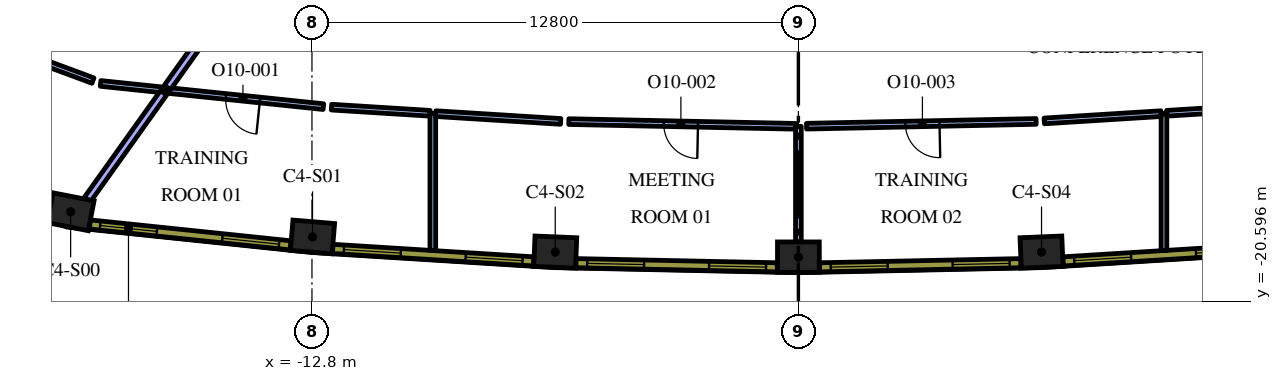
"""IFC4 building model, lengths in metres.
Left out: names, types, materials, properties, quantities, classifications, styles, units other than length and angle.
Written with IfcOpenShell. Run it as: python <this file> out.ifc"""

import sys

from ifc_helpers import new_model, si_unit, direction, frame, frame_2d, origin, origin_2d, place, context, subcontext, project, spatial, rectangle, extrude, element, fill, save


model = new_model("IFC4")
c1 = context("Model", 3, precision=1e-05, world=origin(), true_north=direction((0.0, 1.0)))
c2 = subcontext(c1, "Body", "Model", "MODEL_VIEW")
j1 = project(units=[si_unit("LENGTHUNIT", "METRE"), si_unit("PLANEANGLEUNIT", "RADIAN")], contexts=[c1])
p1 = place(None, origin())
s1 = spatial("IfcSite", under=j1, at=p1, CompositionType="ELEMENT")
p2 = place(p1, origin())
s2 = spatial("IfcBuilding", under=s1, at=p2, CompositionType="ELEMENT")
p3 = place(p2, frame((0.0, 0.0, 252.0)))
s3 = spatial("IfcBuildingStorey", under=s2, at=p3, CompositionType="ELEMENT", Elevation=252.0)
for number, where, z_axis, x_axis in (
    (1, (-19.15, -18.237, 0.0), (0.0, 0.0, 1.0), (0.981, -0.192, 0.0)),
    (2, (-12.785, -18.9, 0.0), (0.0, 0.0, 1.0), (0.997, -0.083, 0.0)),
    (3, (-6.398, -19.298, 0.0), (0.0, 0.0, 1.0), (0.999, -0.041, 0.0)),
    (4, (0.0, -19.431, 0.0), (0.0, 0.0, 1.0), (1.0, 0.0, 0.0)),
    (5, (6.398, -19.298, 0.0), (0.0, 0.0, 1.0), (0.999, 0.041, 0.0)),
):
    element("IfcColumn", number, at=place(p3, frame(where, z_axis=z_axis, x_axis=x_axis)), inside=s3, PredefinedType="COLUMN", context=c2, shape_type="SweptSolid", body=[
        extrude(rectangle(XDim=1.1, YDim=0.8, at=origin_2d()), origin(), (0.0, 0.0, 1.0), 4.2),
    ])
p4 = place(p3, frame((-9.62, -15.65, 0.0), z_axis=(0.0, 0.0, 1.0), x_axis=(0.0, -1.0, 0.0)))
e6 = element("IfcWall", 6, at=p4, inside=s3, PredefinedType="PARTITIONING", context=c2, shape_type="SweptSolid", body=[
    extrude(rectangle(XDim=3.607, YDim=0.15, at=frame_2d((1.803, 0.0))), origin(), (0.0, 0.0, 1.0), 3.4),
])
p5 = place(p3, frame((-12.5, -15.471, 0.0), z_axis=(0.0, 0.0, 1.0), x_axis=(-0.99462267413, 0.103565129778, 0.0)))
e7 = element("IfcWall", 7, at=p5, inside=s3, PredefinedType="PARTITIONING", context=c2, shape_type="SweptSolid", body=[
    extrude(rectangle(XDim=4.177, YDim=0.15, at=frame_2d((2.089, 0.0))), origin(), (0.0, 0.0, 1.0), 3.4),
])
p6 = place(p5, frame((1.677, 0.0, 0.0)))
e8 = element("IfcOpeningElement", 8, at=p6, cuts=e7, PredefinedType="OPENING", context=c2, shape_type="SweptSolid", body=[
    extrude(rectangle(XDim=0.9, YDim=2.1, at=frame_2d((0.45, 1.05))), frame((0.0, 0.085, 0.0), z_axis=(0.0, -1.0, 0.0), x_axis=(1.0, 0.0, 0.0)), (0.0, 0.0, 1.0), 0.17),
])
p7 = place(p3, frame((-12.286, -15.484, 0.0), z_axis=(0.0, 0.0, 1.0), x_axis=(0.99806098397, -0.062243652509, 0.0)))
e9 = element("IfcWall", 9, at=p7, inside=s3, PredefinedType="PARTITIONING", context=c2, shape_type="SweptSolid", body=[
    extrude(rectangle(XDim=2.597, YDim=0.15, at=frame_2d((1.298, 0.0))), origin(), (0.0, 0.0, 1.0), 3.4),
])
p8 = place(p3, frame((-18.709, -17.916, 0.0), z_axis=(0.0, 0.0, 1.0), x_axis=(0.581023923954, 0.813886478444, 0.0)))
e10 = element("IfcWall", 10, at=p8, inside=s3, PredefinedType="PARTITIONING", context=c2, shape_type="SweptSolid", body=[
    extrude(rectangle(XDim=3.449, YDim=0.2, at=frame_2d((1.725, 0.0))), origin(), (0.0, 0.0, 1.0), 3.4),
])
p9 = place(p3, frame((0.0, -15.99, 0.0), z_axis=(0.0, 0.0, 1.0), x_axis=(0.0, -1.0, 0.0)))
e11 = element("IfcWall", 11, at=p9, inside=s3, PredefinedType="PARTITIONING", context=c2, shape_type="SweptSolid", body=[
    extrude(rectangle(XDim=3.041, YDim=0.15, at=frame_2d((1.52, 0.0))), origin(), (0.0, 0.0, 1.0), 3.4),
])
p10 = place(p3, frame((-9.545, -15.655, 0.0), z_axis=(0.0, 0.0, 1.0), x_axis=(0.998062078928, -0.062226092652, 0.0)))
e12 = element("IfcWall", 12, at=p10, inside=s3, PredefinedType="PARTITIONING", context=c2, shape_type="SweptSolid", body=[
    extrude(rectangle(XDim=3.296, YDim=0.15, at=frame_2d((1.648, 0.0))), origin(), (0.0, 0.0, 1.0), 3.4),
])
p11 = place(p3, frame((-0.075, -15.988, 0.0), z_axis=(0.0, 0.0, 1.0), x_axis=(-0.999784863333, 0.020741915284, 0.0)))
e13 = element("IfcWall", 13, at=p11, inside=s3, PredefinedType="PARTITIONING", context=c2, shape_type="SweptSolid", body=[
    extrude(rectangle(XDim=5.968, YDim=0.15, at=frame_2d((2.984, 0.0))), origin(), (0.0, 0.0, 1.0), 3.4),
])
p12 = place(p11, frame((2.567, 0.0, 0.0)))
e14 = element("IfcOpeningElement", 14, at=p12, cuts=e13, PredefinedType="OPENING", context=c2, shape_type="SweptSolid", body=[
    extrude(rectangle(XDim=0.9, YDim=2.1, at=frame_2d((0.45, 1.05))), frame((0.0, 0.085, 0.0), z_axis=(0.0, -1.0, 0.0), x_axis=(1.0, 0.0, 0.0)), (0.0, 0.0, 1.0), 0.17),
])
p13 = place(p3, frame((9.62, -15.65, 0.0), z_axis=(0.0, 0.0, 1.0), x_axis=(0.0, -1.0, 0.0)))
e15 = element("IfcWall", 15, at=p13, inside=s3, PredefinedType="PARTITIONING", context=c2, shape_type="SweptSolid", body=[
    extrude(rectangle(XDim=3.607, YDim=0.15, at=frame_2d((1.803, 0.0))), origin(), (0.0, 0.0, 1.0), 3.4),
])
p14 = place(p3, frame((6.255, -15.86, 0.0), z_axis=(0.0, 0.0, 1.0), x_axis=(-0.999785172511, -0.020727007213, 0.0)))
e16 = element("IfcWall", 16, at=p14, inside=s3, PredefinedType="PARTITIONING", context=c2, shape_type="SweptSolid", body=[
    extrude(rectangle(XDim=6.042, YDim=0.15, at=frame_2d((3.021, 0.0))), origin(), (0.0, 0.0, 1.0), 3.4),
])
p15 = place(p14, frame((2.542, 0.0, 0.0)))
e17 = element("IfcOpeningElement", 17, at=p15, cuts=e16, PredefinedType="OPENING", context=c2, shape_type="SweptSolid", body=[
    extrude(rectangle(XDim=0.9, YDim=2.1, at=frame_2d((0.45, 1.05))), frame((0.0, 0.085, 0.0), z_axis=(0.0, -1.0, 0.0), x_axis=(1.0, 0.0, 0.0)), (0.0, 0.0, 1.0), 0.17),
])
p16 = place(p3, frame((6.469, -15.847, 0.0), z_axis=(0.0, 0.0, 1.0), x_axis=(0.998063968491, 0.062195777984, 0.0)))
e18 = element("IfcWall", 18, at=p16, inside=s3, PredefinedType="PARTITIONING", context=c2, shape_type="SweptSolid", body=[
    extrude(rectangle(XDim=3.081, YDim=0.15, at=frame_2d((1.541, 0.0))), origin(), (0.0, 0.0, 1.0), 3.4),
])
p17 = place(p3, frame((9.695, -15.646, 0.0), z_axis=(0.0, 0.0, 1.0), x_axis=(0.998058994434, 0.062275545993, 0.0)))
e19 = element("IfcWall", 19, at=p17, inside=s3, PredefinedType="PARTITIONING", context=c2, shape_type="SweptSolid", body=[
    extrude(rectangle(XDim=2.811, YDim=0.15, at=frame_2d((1.405, 0.0))), origin(), (0.0, 0.0, 1.0), 3.4),
])
p18 = place(p3, frame((-16.604, -14.968, 0.0), z_axis=(0.0, 0.0, 1.0), x_axis=(0.581000735813, 0.813903031684, 0.0)))
e20 = element("IfcWall", 20, at=p18, inside=s3, PredefinedType="PARTITIONING", context=c2, shape_type="SweptSolid", body=[
    extrude(rectangle(XDim=3.696, YDim=0.2, at=frame_2d((1.848, 0.0))), origin(), (0.0, 0.0, 1.0), 3.4),
])
p19 = place(p3, frame((-16.769, -15.026, 0.0), z_axis=(0.0, 0.0, 1.0), x_axis=(-0.994627569422, 0.103518105401, 0.0)))
e21 = element("IfcWall", 21, at=p19, inside=s3, PredefinedType="PARTITIONING", context=c2, shape_type="SweptSolid", body=[
    extrude(rectangle(XDim=1.601, YDim=0.15, at=frame_2d((0.801, 0.0))), origin(), (0.0, 0.0, 1.0), 3.4),
])
p20 = place(p3, frame((-18.562, -14.786, 0.0), z_axis=(0.0, 0.0, 1.0), x_axis=(-0.937602119917, 0.347710029662, 0.0)))
e22 = element("IfcWall", 22, at=p20, inside=s3, PredefinedType="PARTITIONING", context=c2, shape_type="SweptSolid", body=[
    extrude(rectangle(XDim=2.11, YDim=0.15, at=frame_2d((1.055, 0.0))), origin(), (0.0, 0.0, 1.0), 3.4),
])
p21 = place(p3, frame((-18.644, -18.571, 0.0), z_axis=(0.0, 0.0, 1.0), x_axis=(0.994621961215, -0.103571976272, 0.0)))
e23 = element("IfcWall", 23, at=p21, inside=s3, PredefinedType="SOLIDWALL", context=c2, shape_type="SweptSolid", body=[
    extrude(rectangle(XDim=5.311, YDim=0.24, at=frame_2d((2.655, 0.0))), origin(), (0.0, 0.0, 1.0), 3.9),
])
p22 = place(p21, frame((0.271, 0.0, 0.9)))
e24 = element("IfcOpeningElement", 24, at=p22, cuts=e23, PredefinedType="OPENING", context=c2, shape_type="SweptSolid", body=[
    extrude(rectangle(XDim=1.5, YDim=2.55, at=frame_2d((0.75, 1.275))), frame((0.0, 0.13, 0.0), z_axis=(0.0, -1.0, 0.0), x_axis=(1.0, 0.0, 0.0)), (0.0, 0.0, 1.0), 0.26),
])
p23 = place(p21, frame((3.504, 0.0, 0.9)))
e25 = element("IfcOpeningElement", 25, at=p23, cuts=e23, PredefinedType="OPENING", context=c2, shape_type="SweptSolid", body=[
    extrude(rectangle(XDim=1.5, YDim=2.55, at=frame_2d((0.75, 1.275))), frame((0.0, 0.13, 0.0), z_axis=(0.0, -1.0, 0.0), x_axis=(1.0, 0.0, 0.0)), (0.0, 0.0, 1.0), 0.26),
])
p24 = place(p3, frame((-12.253, -19.213, 0.0), z_axis=(0.0, 0.0, 1.0), x_axis=(0.9980633213, -0.062206162685, 0.0)))
e26 = element("IfcWall", 26, at=p24, inside=s3, PredefinedType="SOLIDWALL", context=c2, shape_type="SweptSolid", body=[
    extrude(rectangle(XDim=5.298, YDim=0.24, at=frame_2d((2.649, 0.0))), origin(), (0.0, 0.0, 1.0), 3.9),
])
p25 = place(p24, frame((0.294, 0.0, 0.9)))
e27 = element("IfcOpeningElement", 27, at=p25, cuts=e26, PredefinedType="OPENING", context=c2, shape_type="SweptSolid", body=[
    extrude(rectangle(XDim=1.5, YDim=2.55, at=frame_2d((0.75, 1.275))), frame((0.0, 0.13, 0.0), z_axis=(0.0, -1.0, 0.0), x_axis=(1.0, 0.0, 0.0)), (0.0, 0.0, 1.0), 0.26),
])
p26 = place(p24, frame((3.504, 0.0, 0.9)))
e28 = element("IfcOpeningElement", 28, at=p26, cuts=e26, PredefinedType="OPENING", context=c2, shape_type="SweptSolid", body=[
    extrude(rectangle(XDim=1.5, YDim=2.55, at=frame_2d((0.75, 1.275))), frame((0.0, 0.13, 0.0), z_axis=(0.0, -1.0, 0.0), x_axis=(1.0, 0.0, 0.0)), (0.0, 0.0, 1.0), 0.26),
])
p27 = place(p3, frame((-5.854, -19.589, 0.0), z_axis=(0.0, 0.0, 1.0), x_axis=(0.999784035184, -0.020781794712, 0.0)))
e29 = element("IfcWall", 29, at=p27, inside=s3, PredefinedType="SOLIDWALL", context=c2, shape_type="SweptSolid", body=[
    extrude(rectangle(XDim=5.298, YDim=0.24, at=frame_2d((2.649, 0.0))), origin(), (0.0, 0.0, 1.0), 3.9),
])
p28 = place(p27, frame((0.294, 0.0, 0.9)))
e30 = element("IfcOpeningElement", 30, at=p28, cuts=e29, PredefinedType="OPENING", context=c2, shape_type="SweptSolid", body=[
    extrude(rectangle(XDim=1.5, YDim=2.55, at=frame_2d((0.75, 1.275))), frame((0.0, 0.13, 0.0), z_axis=(0.0, -1.0, 0.0), x_axis=(1.0, 0.0, 0.0)), (0.0, 0.0, 1.0), 0.26),
])
p29 = place(p27, frame((3.504, 0.0, 0.9)))
e31 = element("IfcOpeningElement", 31, at=p29, cuts=e29, PredefinedType="OPENING", context=c2, shape_type="SweptSolid", body=[
    extrude(rectangle(XDim=1.5, YDim=2.55, at=frame_2d((0.75, 1.275))), frame((0.0, 0.13, 0.0), z_axis=(0.0, -1.0, 0.0), x_axis=(1.0, 0.0, 0.0)), (0.0, 0.0, 1.0), 0.26),
])
p30 = place(p3, frame((0.556, -19.699, 0.0), z_axis=(0.0, 0.0, 1.0), x_axis=(0.999784035184, 0.020781794712, 0.0)))
e32 = element("IfcWall", 32, at=p30, inside=s3, PredefinedType="SOLIDWALL", context=c2, shape_type="SweptSolid", body=[
    extrude(rectangle(XDim=5.298, YDim=0.24, at=frame_2d((2.649, 0.0))), origin(), (0.0, 0.0, 1.0), 3.9),
])
p31 = place(p30, frame((0.294, 0.0, 0.9)))
e33 = element("IfcOpeningElement", 33, at=p31, cuts=e32, PredefinedType="OPENING", context=c2, shape_type="SweptSolid", body=[
    extrude(rectangle(XDim=1.5, YDim=2.55, at=frame_2d((0.75, 1.275))), frame((0.0, 0.13, 0.0), z_axis=(0.0, -1.0, 0.0), x_axis=(1.0, 0.0, 0.0)), (0.0, 0.0, 1.0), 0.26),
])
p32 = place(p30, frame((3.504, 0.0, 0.9)))
e34 = element("IfcOpeningElement", 34, at=p32, cuts=e32, PredefinedType="OPENING", context=c2, shape_type="SweptSolid", body=[
    extrude(rectangle(XDim=1.5, YDim=2.55, at=frame_2d((0.75, 1.275))), frame((0.0, 0.13, 0.0), z_axis=(0.0, -1.0, 0.0), x_axis=(1.0, 0.0, 0.0)), (0.0, 0.0, 1.0), 0.26),
])
p33 = place(p3, frame((6.965, -19.543, 0.0), z_axis=(0.0, 0.0, 1.0), x_axis=(0.9980633213, 0.062206162685, 0.0)))
e35 = element("IfcWall", 35, at=p33, inside=s3, PredefinedType="SOLIDWALL", context=c2, shape_type="SweptSolid", body=[
    extrude(rectangle(XDim=5.298, YDim=0.24, at=frame_2d((2.649, 0.0))), origin(), (0.0, 0.0, 1.0), 3.9),
])
p34 = place(p33, frame((0.295, 0.0, 0.9)))
e36 = element("IfcOpeningElement", 36, at=p34, cuts=e35, PredefinedType="OPENING", context=c2, shape_type="SweptSolid", body=[
    extrude(rectangle(XDim=1.5, YDim=2.55, at=frame_2d((0.75, 1.275))), frame((0.0, 0.13, 0.0), z_axis=(0.0, -1.0, 0.0), x_axis=(1.0, 0.0, 0.0)), (0.0, 0.0, 1.0), 0.26),
])
p35 = place(p33, frame((3.504, 0.0, 0.9)))
e37 = element("IfcOpeningElement", 37, at=p35, cuts=e35, PredefinedType="OPENING", context=c2, shape_type="SweptSolid", body=[
    extrude(rectangle(XDim=1.5, YDim=2.55, at=frame_2d((0.75, 1.275))), frame((0.0, 0.13, 0.0), z_axis=(0.0, -1.0, 0.0), x_axis=(1.0, 0.0, 0.0)), (0.0, 0.0, 1.0), 0.26),
])
p36 = place(p6, origin())
e38 = element("IfcDoor", 38, at=p36, inside=s3, OperationType="SINGLE_SWING_RIGHT", PredefinedType="DOOR", context=c2, shape_type="SweptSolid", body=[
    extrude(rectangle(XDim=0.9, YDim=2.1, at=frame_2d((0.45, 1.05))), frame((0.0, 0.025, 0.0), z_axis=(0.0, -1.0, 0.0), x_axis=(1.0, 0.0, 0.0)), (0.0, 0.0, 1.0), 0.05),
])
fill(e8, e38)
p37 = place(p12, origin())
e39 = element("IfcDoor", 39, at=p37, inside=s3, OperationType="SINGLE_SWING_RIGHT", PredefinedType="DOOR", context=c2, shape_type="SweptSolid", body=[
    extrude(rectangle(XDim=0.9, YDim=2.1, at=frame_2d((0.45, 1.05))), frame((0.0, 0.025, 0.0), z_axis=(0.0, -1.0, 0.0), x_axis=(1.0, 0.0, 0.0)), (0.0, 0.0, 1.0), 0.05),
])
fill(e14, e39)
p38 = place(p15, origin())
e40 = element("IfcDoor", 40, at=p38, inside=s3, OperationType="SINGLE_SWING_LEFT", PredefinedType="DOOR", context=c2, shape_type="SweptSolid", body=[
    extrude(rectangle(XDim=0.9, YDim=2.1, at=frame_2d((0.45, 1.05))), frame((0.0, 0.025, 0.0), z_axis=(0.0, -1.0, 0.0), x_axis=(1.0, 0.0, 0.0)), (0.0, 0.0, 1.0), 0.05),
])
fill(e17, e40)
p39 = place(p22, origin())
e41 = element("IfcWindow", 41, at=p39, inside=s3, PartitioningType="SINGLE_PANEL", PredefinedType="WINDOW", context=c2, shape_type="SweptSolid", body=[
    extrude(rectangle(XDim=1.5, YDim=2.55, at=frame_2d((0.75, 1.275))), frame((0.0, 0.04, 0.0), z_axis=(0.0, -1.0, 0.0), x_axis=(1.0, 0.0, 0.0)), (0.0, 0.0, 1.0), 0.06),
])
fill(e24, e41)
p40 = place(p23, origin())
e42 = element("IfcWindow", 42, at=p40, inside=s3, PartitioningType="SINGLE_PANEL", PredefinedType="WINDOW", context=c2, shape_type="SweptSolid", body=[
    extrude(rectangle(XDim=1.5, YDim=2.55, at=frame_2d((0.75, 1.275))), frame((0.0, 0.04, 0.0), z_axis=(0.0, -1.0, 0.0), x_axis=(1.0, 0.0, 0.0)), (0.0, 0.0, 1.0), 0.06),
])
fill(e25, e42)
p41 = place(p25, origin())
e43 = element("IfcWindow", 43, at=p41, inside=s3, PartitioningType="SINGLE_PANEL", PredefinedType="WINDOW", context=c2, shape_type="SweptSolid", body=[
    extrude(rectangle(XDim=1.5, YDim=2.55, at=frame_2d((0.75, 1.275))), frame((0.0, 0.04, 0.0), z_axis=(0.0, -1.0, 0.0), x_axis=(1.0, 0.0, 0.0)), (0.0, 0.0, 1.0), 0.06),
])
fill(e27, e43)
p42 = place(p26, origin())
e44 = element("IfcWindow", 44, at=p42, inside=s3, PartitioningType="SINGLE_PANEL", PredefinedType="WINDOW", context=c2, shape_type="SweptSolid", body=[
    extrude(rectangle(XDim=1.5, YDim=2.55, at=frame_2d((0.75, 1.275))), frame((0.0, 0.04, 0.0), z_axis=(0.0, -1.0, 0.0), x_axis=(1.0, 0.0, 0.0)), (0.0, 0.0, 1.0), 0.06),
])
fill(e28, e44)
p43 = place(p28, origin())
e45 = element("IfcWindow", 45, at=p43, inside=s3, PartitioningType="SINGLE_PANEL", PredefinedType="WINDOW", context=c2, shape_type="SweptSolid", body=[
    extrude(rectangle(XDim=1.5, YDim=2.55, at=frame_2d((0.75, 1.275))), frame((0.0, 0.04, 0.0), z_axis=(0.0, -1.0, 0.0), x_axis=(1.0, 0.0, 0.0)), (0.0, 0.0, 1.0), 0.06),
])
fill(e30, e45)
p44 = place(p29, origin())
e46 = element("IfcWindow", 46, at=p44, inside=s3, PartitioningType="SINGLE_PANEL", PredefinedType="WINDOW", context=c2, shape_type="SweptSolid", body=[
    extrude(rectangle(XDim=1.5, YDim=2.55, at=frame_2d((0.75, 1.275))), frame((0.0, 0.04, 0.0), z_axis=(0.0, -1.0, 0.0), x_axis=(1.0, 0.0, 0.0)), (0.0, 0.0, 1.0), 0.06),
])
fill(e31, e46)
p45 = place(p31, origin())
e47 = element("IfcWindow", 47, at=p45, inside=s3, PartitioningType="SINGLE_PANEL", PredefinedType="WINDOW", context=c2, shape_type="SweptSolid", body=[
    extrude(rectangle(XDim=1.5, YDim=2.55, at=frame_2d((0.75, 1.275))), frame((0.0, 0.04, 0.0), z_axis=(0.0, -1.0, 0.0), x_axis=(1.0, 0.0, 0.0)), (0.0, 0.0, 1.0), 0.06),
])
fill(e33, e47)
p46 = place(p32, origin())
e48 = element("IfcWindow", 48, at=p46, inside=s3, PartitioningType="SINGLE_PANEL", PredefinedType="WINDOW", context=c2, shape_type="SweptSolid", body=[
    extrude(rectangle(XDim=1.5, YDim=2.55, at=frame_2d((0.75, 1.275))), frame((0.0, 0.04, 0.0), z_axis=(0.0, -1.0, 0.0), x_axis=(1.0, 0.0, 0.0)), (0.0, 0.0, 1.0), 0.06),
])
fill(e34, e48)
p47 = place(p34, origin())
e49 = element("IfcWindow", 49, at=p47, inside=s3, PartitioningType="SINGLE_PANEL", PredefinedType="WINDOW", context=c2, shape_type="SweptSolid", body=[
    extrude(rectangle(XDim=1.5, YDim=2.55, at=frame_2d((0.75, 1.275))), frame((0.0, 0.04, 0.0), z_axis=(0.0, -1.0, 0.0), x_axis=(1.0, 0.0, 0.0)), (0.0, 0.0, 1.0), 0.06),
])
fill(e36, e49)
p48 = place(p35, origin())
e50 = element("IfcWindow", 50, at=p48, inside=s3, PartitioningType="SINGLE_PANEL", PredefinedType="WINDOW", context=c2, shape_type="SweptSolid", body=[
    extrude(rectangle(XDim=1.5, YDim=2.55, at=frame_2d((0.75, 1.275))), frame((0.0, 0.04, 0.0), z_axis=(0.0, -1.0, 0.0), x_axis=(1.0, 0.0, 0.0)), (0.0, 0.0, 1.0), 0.06),
])
fill(e37, e50)
save(model, sys.argv[1])
